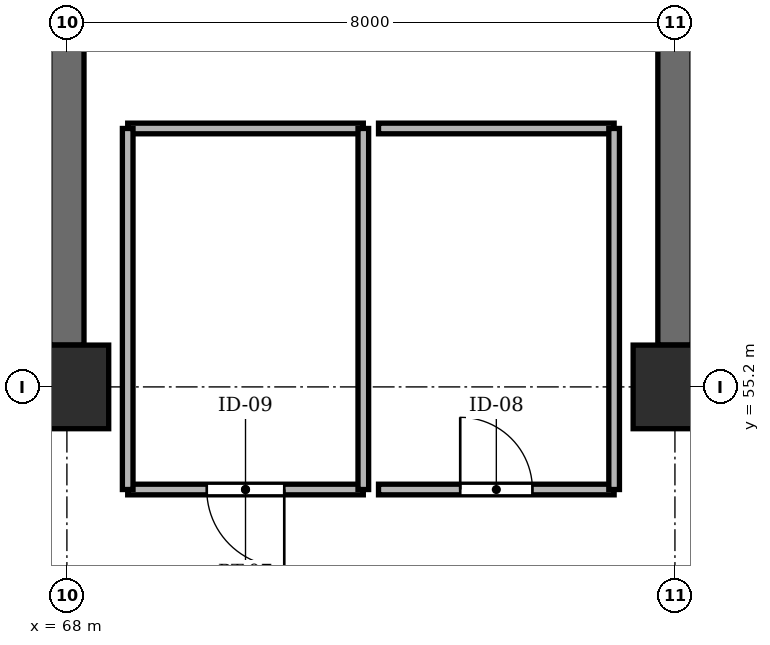
"""IFC4 building model, lengths in metres.
Left out: names, types, materials, properties, quantities, classifications, styles, units other than length and angle.
Written with IfcOpenShell. Run it as: python <this file> out.ifc"""

import sys

from ifc_helpers import new_model, si_unit, direction, frame, frame_2d, origin, origin_2d, place, context, subcontext, project, spatial, rectangle, extrude, element, fill, save


model = new_model("IFC4")
c1 = context("Model", 3, precision=1e-05, world=origin(), true_north=direction((0.0, 1.0)))
c2 = subcontext(c1, "Body", "Model", "MODEL_VIEW")
j1 = project(units=[si_unit("LENGTHUNIT", "METRE"), si_unit("PLANEANGLEUNIT", "RADIAN")], contexts=[c1])
p1 = place(None, origin())
s1 = spatial("IfcSite", under=j1, at=p1, CompositionType="ELEMENT")
p2 = place(p1, origin())
s2 = spatial("IfcBuilding", under=s1, at=p2, CompositionType="ELEMENT")
p3 = place(p2, frame((0.0, 0.0, 24.15)))
s3 = spatial("IfcBuildingStorey", under=s2, at=p3, CompositionType="ELEMENT", Elevation=24.15)
for number, where, z_axis, x_axis in (
    (1, (68.0, 55.2, -0.5), (0.0, 0.0, 1.0), (1.0, 0.0, 0.0)),
    (2, (76.0, 55.2, -0.5), (0.0, 0.0, 1.0), (1.0, 0.0, 0.0)),
):
    element("IfcColumn", number, at=place(p3, frame(where, z_axis=z_axis, x_axis=x_axis)), inside=s3, PredefinedType="COLUMN", context=c2, shape_type="SweptSolid", body=[
        extrude(rectangle(XDim=1.1, YDim=1.1, at=origin_2d()), origin(), (0.0, 0.0, 1.0), 3.64),
    ])
for number, where, z_axis, x_axis in (
    (3, (68.0, 55.75, 0.0), (0.0, 0.0, 1.0), (0.0, 1.0, 0.0)),
    (4, (76.0, 55.75, 0.0), (0.0, 0.0, 1.0), (0.0, 1.0, 0.0)),
):
    element("IfcWall", number, at=place(p3, frame(where, z_axis=z_axis, x_axis=x_axis)), inside=s3, PredefinedType="SHEAR", context=c2, shape_type="SweptSolid", body=[
        extrude(rectangle(XDim=6.2, YDim=0.45, at=frame_2d((3.1, 0.0))), origin(), (0.0, 0.0, 1.0), 3.14),
    ])
p4 = place(p3, frame((68.8, 53.85, 0.0), z_axis=(0.0, 0.0, 1.0), x_axis=(1.0, 0.0, 0.0)))
e5 = element("IfcWall", 5, at=p4, inside=s3, PredefinedType="PARTITIONING", context=c2, shape_type="SweptSolid", body=[
    extrude(rectangle(XDim=3.1, YDim=0.14, at=frame_2d((1.55, 0.0))), origin(), (0.0, 0.0, 1.0), 2.68),
])
p5 = place(p4, frame((1.04, 0.0, 0.0)))
e6 = element("IfcOpeningElement", 6, at=p5, cuts=e5, PredefinedType="OPENING", context=c2, shape_type="SweptSolid", body=[
    extrude(rectangle(XDim=1.02, YDim=2.1, at=frame_2d((0.51, 1.05))), frame((0.0, 0.082, 0.0), z_axis=(0.0, -1.0, 0.0), x_axis=(1.0, 0.0, 0.0)), (0.0, 0.0, 1.0), 0.164),
])
p6 = place(p3, frame((68.8, 58.6, 0.0), z_axis=(0.0, 0.0, 1.0), x_axis=(1.0, 0.0, 0.0)))
e7 = element("IfcWall", 7, at=p6, inside=s3, PredefinedType="PARTITIONING", context=c2, shape_type="SweptSolid", body=[
    extrude(rectangle(XDim=3.1, YDim=0.14, at=frame_2d((1.55, 0.0))), origin(), (0.0, 0.0, 1.0), 2.68),
])
for number, where, z_axis, x_axis in (
    (8, (68.8, 53.85, 0.0), (0.0, 0.0, 1.0), (0.0, 1.0, 0.0)),
    (9, (71.9, 53.85, 0.0), (0.0, 0.0, 1.0), (0.0, 1.0, 0.0)),
):
    element("IfcWall", number, at=place(p3, frame(where, z_axis=z_axis, x_axis=x_axis)), inside=s3, PredefinedType="PARTITIONING", context=c2, shape_type="SweptSolid", body=[
        extrude(rectangle(XDim=4.75, YDim=0.14, at=frame_2d((2.375, 0.0))), origin(), (0.0, 0.0, 1.0), 2.68),
    ])
p7 = place(p3, frame((72.1, 53.85, 0.0), z_axis=(0.0, 0.0, 1.0), x_axis=(1.0, 0.0, 0.0)))
e10 = element("IfcWall", 10, at=p7, inside=s3, PredefinedType="PARTITIONING", context=c2, shape_type="SweptSolid", body=[
    extrude(rectangle(XDim=3.1, YDim=0.14, at=frame_2d((1.55, 0.0))), origin(), (0.0, 0.0, 1.0), 2.68),
])
p8 = place(p7, frame((1.075, 0.0, 0.0)))
e11 = element("IfcOpeningElement", 11, at=p8, cuts=e10, PredefinedType="OPENING", context=c2, shape_type="SweptSolid", body=[
    extrude(rectangle(XDim=0.95, YDim=2.1, at=frame_2d((0.475, 1.05))), frame((0.0, 0.082, 0.0), z_axis=(0.0, -1.0, 0.0), x_axis=(1.0, 0.0, 0.0)), (0.0, 0.0, 1.0), 0.164),
])
p9 = place(p3, frame((72.1, 58.6, 0.0), z_axis=(0.0, 0.0, 1.0), x_axis=(1.0, 0.0, 0.0)))
e12 = element("IfcWall", 12, at=p9, inside=s3, PredefinedType="PARTITIONING", context=c2, shape_type="SweptSolid", body=[
    extrude(rectangle(XDim=3.1, YDim=0.14, at=frame_2d((1.55, 0.0))), origin(), (0.0, 0.0, 1.0), 2.68),
])
p10 = place(p3, frame((75.2, 53.85, 0.0), z_axis=(0.0, 0.0, 1.0), x_axis=(0.0, 1.0, 0.0)))
e13 = element("IfcWall", 13, at=p10, inside=s3, PredefinedType="PARTITIONING", context=c2, shape_type="SweptSolid", body=[
    extrude(rectangle(XDim=4.75, YDim=0.14, at=frame_2d((2.375, 0.0))), origin(), (0.0, 0.0, 1.0), 2.68),
])
p11 = place(p5, frame((1.02, 0.0, 0.0), z_axis=(0.0, 0.0, 1.0), x_axis=(-1.0, 0.0, 0.0)))
e14 = element("IfcDoor", 14, at=p11, inside=s3, OperationType="SINGLE_SWING_RIGHT", PredefinedType="DOOR", context=c2, shape_type="SweptSolid", body=[
    extrude(rectangle(XDim=1.02, YDim=2.1, at=frame_2d((0.51, 1.05))), frame((0.0, 0.025, 0.0), z_axis=(0.0, -1.0, 0.0), x_axis=(1.0, 0.0, 0.0)), (0.0, 0.0, 1.0), 0.05),
])
fill(e6, e14)
p12 = place(p8, origin())
e15 = element("IfcDoor", 15, at=p12, inside=s3, OperationType="SINGLE_SWING_LEFT", PredefinedType="DOOR", context=c2, shape_type="SweptSolid", body=[
    extrude(rectangle(XDim=0.95, YDim=2.1, at=frame_2d((0.475, 1.05))), frame((0.0, 0.025, 0.0), z_axis=(0.0, -1.0, 0.0), x_axis=(1.0, 0.0, 0.0)), (0.0, 0.0, 1.0), 0.05),
])
fill(e11, e15)
save(model, sys.argv[1])
